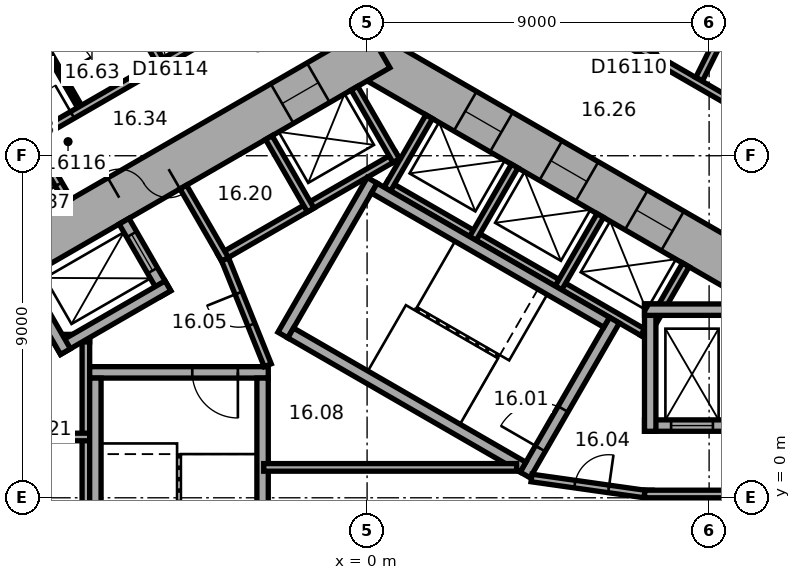
"""IFC4 building model, lengths in metres.
Left out: names, types, materials, properties, quantities, classifications, styles, units other than length and angle.
Written with IfcOpenShell. Run it as: python <this file> out.ifc"""

import sys

from ifc_helpers import new_model, si_unit, direction, frame, frame_2d, origin, place, context, subcontext, project, spatial, rectangle, extrude, element, fill, save


model = new_model("IFC4")
c1 = context("Model", 3, precision=1e-05, world=origin(), true_north=direction((0.0, 1.0)))
c2 = subcontext(c1, "Body", "Model", "MODEL_VIEW")
j1 = project(units=[si_unit("LENGTHUNIT", "METRE"), si_unit("PLANEANGLEUNIT", "RADIAN")], contexts=[c1])
p1 = place(None, origin())
s1 = spatial("IfcSite", under=j1, at=p1, CompositionType="ELEMENT")
p2 = place(p1, origin())
s2 = spatial("IfcBuilding", under=s1, at=p2, CompositionType="ELEMENT")
p3 = place(p2, frame((0.0, 0.0, 73.7)))
s3 = spatial("IfcBuildingStorey", under=s2, at=p3, CompositionType="ELEMENT", Elevation=73.7)
p4 = place(p3, frame((10.4, 5.658, 0.0), z_axis=(0.0, 0.0, 1.0), x_axis=(-0.866021384402, 0.500006961711, 0.0)))
e1 = element("IfcWall", 1, at=p4, inside=s3, PredefinedType="SHEAR", context=c2, shape_type="SweptSolid", body=[
    extrude(rectangle(XDim=12.355, YDim=1.2, at=frame_2d((6.178, 0.0))), origin(), (0.0, 0.0, 1.0), 3.3),
])
p5 = place(p4, frame((2.728, 0.0, 0.0)))
e2 = element("IfcOpeningElement", 2, at=p5, cuts=e1, PredefinedType="OPENING", context=c2, shape_type="SweptSolid", body=[
    extrude(rectangle(XDim=1.1, YDim=2.1, at=frame_2d((0.55, 1.05))), frame((0.0, 0.61, 0.0), z_axis=(0.0, -1.0, 0.0), x_axis=(1.0, 0.0, 0.0)), (0.0, 0.0, 1.0), 1.22),
])
p6 = place(p4, frame((5.328, 0.0, 0.0)))
e3 = element("IfcOpeningElement", 3, at=p6, cuts=e1, PredefinedType="OPENING", context=c2, shape_type="SweptSolid", body=[
    extrude(rectangle(XDim=1.1, YDim=2.1, at=frame_2d((0.55, 1.05))), frame((0.0, 0.61, 0.0), z_axis=(0.0, -1.0, 0.0), x_axis=(1.0, 0.0, 0.0)), (0.0, 0.0, 1.0), 1.22),
])
p7 = place(p4, frame((7.928, 0.0, 0.0)))
e4 = element("IfcOpeningElement", 4, at=p7, cuts=e1, PredefinedType="OPENING", context=c2, shape_type="SweptSolid", body=[
    extrude(rectangle(XDim=1.1, YDim=2.1, at=frame_2d((0.55, 1.05))), frame((0.0, 0.61, 0.0), z_axis=(0.0, -1.0, 0.0), x_axis=(1.0, 0.0, 0.0)), (0.0, 0.0, 1.0), 1.22),
])
p8 = place(p3, frame((0.3, 11.836, 0.0), z_axis=(0.0, 0.0, 1.0), x_axis=(-0.866021384402, -0.500006961711, 0.0)))
e5 = element("IfcWall", 5, at=p8, inside=s3, PredefinedType="SHEAR", context=c2, shape_type="SweptSolid", body=[
    extrude(rectangle(XDim=12.355, YDim=1.2, at=frame_2d((6.178, 0.0))), origin(), (0.0, 0.0, 1.0), 3.3),
])
p9 = place(p8, frame((6.378, 0.0, 0.0)))
e6 = element("IfcOpeningElement", 6, at=p9, cuts=e5, PredefinedType="OPENING", context=c2, shape_type="SweptSolid", body=[
    extrude(rectangle(XDim=1.5, YDim=2.1, at=frame_2d((0.75, 1.05))), frame((0.0, 0.61, 0.0), z_axis=(0.0, -1.0, 0.0), x_axis=(1.0, 0.0, 0.0)), (0.0, 0.0, 1.0), 1.22),
])
p10 = place(p8, frame((1.828, 0.0, 0.0)))
e7 = element("IfcOpeningElement", 7, at=p10, cuts=e5, PredefinedType="OPENING", context=c2, shape_type="SweptSolid", body=[
    extrude(rectangle(XDim=1.1, YDim=2.1, at=frame_2d((0.55, 1.05))), frame((0.0, 0.61, 0.0), z_axis=(0.0, -1.0, 0.0), x_axis=(1.0, 0.0, 0.0)), (0.0, 0.0, 1.0), 1.22),
])
p11 = place(p3, frame((7.4, -5.2, 0.0), z_axis=(0.0, 0.0, 1.0), x_axis=(0.0, 1.0, 0.0)))
e8 = element("IfcWall", 8, at=p11, inside=s3, PredefinedType="PARTITIONING", context=c2, shape_type="SweptSolid", body=[
    extrude(rectangle(XDim=5.4, YDim=0.2, at=frame_2d((2.7, 0.0))), origin(), (0.0, 0.0, 1.0), 2.95),
])
p12 = place(p3, frame((7.3, 0.1, 0.0), z_axis=(0.0, 0.0, 1.0), x_axis=(1.0, 0.0, 0.0)))
e9 = element("IfcWall", 9, at=p12, inside=s3, PredefinedType="PARTITIONING", context=c2, shape_type="SweptSolid", body=[
    extrude(rectangle(XDim=2.2, YDim=0.2, at=frame_2d((1.1, 0.0))), origin(), (0.0, 0.0, 1.0), 2.95),
])
p13 = place(p3, frame((7.424, 4.259, 0.0), z_axis=(0.0, 0.0, 1.0), x_axis=(-0.866026010844, 0.49999894854, 0.0)))
e10 = element("IfcWall", 10, at=p13, inside=s3, PredefinedType="PARTITIONING", context=c2, shape_type="SweptSolid", body=[
    extrude(rectangle(XDim=8.0, YDim=0.2, at=frame_2d((4.0, 0.0))), origin(), (0.0, 0.0, 1.0), 2.95),
])
for number, where, z_axis, x_axis in (
    (11, (7.287, 4.222, 0.0), (0.0, 0.0, 1.0), (0.5, 0.866, 0.0)),
    (12, (5.036, 5.522, 0.0), (0.0, 0.0, 1.0), (0.5, 0.866, 0.0)),
    (13, (2.784, 6.822, 0.0), (0.0, 0.0, 1.0), (0.5, 0.866, 0.0)),
    (14, (0.532, 8.122, 0.0), (0.0, 0.0, 1.0), (0.5, 0.866, 0.0)),
):
    element("IfcWall", number, at=place(p3, frame(where, z_axis=z_axis, x_axis=x_axis)), inside=s3, PredefinedType="PARTITIONING", context=c2, shape_type="SweptSolid", body=[
        extrude(rectangle(XDim=2.2, YDim=0.2, at=frame_2d((1.1, 0.0))), origin(), (0.0, 0.0, 1.0), 2.95),
    ])
p14 = place(p3, frame((0.803, 9.009, 0.0), z_axis=(0.0, 0.0, 1.0), x_axis=(-0.866028230842, -0.499995103361, 0.0)))
e15 = element("IfcWall", 15, at=p14, inside=s3, PredefinedType="PARTITIONING", context=c2, shape_type="SweptSolid", body=[
    extrude(rectangle(XDim=5.4, YDim=0.2, at=frame_2d((2.7, 0.0))), origin(), (0.0, 0.0, 1.0), 2.95),
])
p15 = place(p3, frame((0.767, 8.872, 0.0), z_axis=(0.0, 0.0, 1.0), x_axis=(-0.499994660107, 0.866028486751, 0.0)))
e16 = element("IfcWall", 16, at=p15, inside=s3, PredefinedType="PARTITIONING", context=c2, shape_type="SweptSolid", body=[
    extrude(rectangle(XDim=2.2, YDim=0.2, at=frame_2d((1.1, 0.0))), origin(), (0.0, 0.0, 1.0), 2.95),
])
for number, where, z_axis, x_axis in (
    (17, (-1.485, 7.572, 0.0), (0.0, 0.0, 1.0), (-0.5, 0.866, 0.0)),
    (18, (-3.737, 6.272, 0.0), (0.0, 0.0, 1.0), (-0.5, 0.866, 0.0)),
):
    element("IfcWall", number, at=place(p3, frame(where, z_axis=z_axis, x_axis=x_axis)), inside=s3, PredefinedType="PARTITIONING", context=c2, shape_type="SweptSolid", body=[
        extrude(rectangle(XDim=2.2, YDim=0.2, at=frame_2d((1.1, 0.0))), origin(), (0.0, 0.0, 1.0), 2.95),
    ])
p16 = place(p3, frame((-7.4, 4.3, 0.0), z_axis=(0.0, 0.0, 1.0), x_axis=(0.0, -1.0, 0.0)))
e19 = element("IfcWall", 19, at=p16, inside=s3, PredefinedType="PARTITIONING", context=c2, shape_type="SweptSolid", body=[
    extrude(rectangle(XDim=8.0, YDim=0.2, at=frame_2d((4.0, 0.0))), origin(), (0.0, 0.0, 1.0), 2.95),
])
for number, where, z_axis, x_axis in (
    (20, (-7.3, 4.2, 0.0), (0.0, 0.0, 1.0), (-1.0, 0.0, 0.0)),
    (21, (-7.3, 1.6, 0.0), (0.0, 0.0, 1.0), (-1.0, 0.0, 0.0)),
):
    element("IfcWall", number, at=place(p3, frame(where, z_axis=z_axis, x_axis=x_axis)), inside=s3, PredefinedType="PARTITIONING", context=c2, shape_type="SweptSolid", body=[
        extrude(rectangle(XDim=2.2, YDim=0.2, at=frame_2d((1.1, 0.0))), origin(), (0.0, 0.0, 1.0), 2.95),
    ])
p17 = place(p3, frame((4.158, 0.602, 0.0), z_axis=(0.0, 0.0, 1.0), x_axis=(0.499977259774, 0.866038532462, 0.0)))
e22 = element("IfcWall", 22, at=p17, inside=s3, PredefinedType="SHEAR", context=c2, shape_type="SweptSolid", body=[
    extrude(rectangle(XDim=4.7, YDim=0.3, at=frame_2d((2.35, 0.0))), origin(), (0.0, 0.0, 1.0), 2.95),
])
p18 = place(p17, frame((0.8, 0.0, 0.0)))
e23 = element("IfcOpeningElement", 23, at=p18, cuts=e22, PredefinedType="OPENING", context=c2, shape_type="SweptSolid", body=[
    extrude(rectangle(XDim=1.2, YDim=2.1, at=frame_2d((0.6, 1.05))), frame((0.0, 0.16, 0.0), z_axis=(0.0, -1.0, 0.0), x_axis=(1.0, 0.0, 0.0)), (0.0, 0.0, 1.0), 0.32),
])
p19 = place(p3, frame((-2.216, 4.282, 0.0), z_axis=(0.0, 0.0, 1.0), x_axis=(0.499977259774, 0.866038532462, 0.0)))
e24 = element("IfcWall", 24, at=p19, inside=s3, PredefinedType="SHEAR", context=c2, shape_type="SweptSolid", body=[
    extrude(rectangle(XDim=4.7, YDim=0.3, at=frame_2d((2.35, 0.0))), origin(), (0.0, 0.0, 1.0), 2.95),
])
for number, where, z_axis, x_axis in (
    (25, (4.103, 0.807, 0.0), (0.0, 0.0, 1.0), (-0.866, 0.5, 0.0)),
    (26, (6.303, 4.617, 0.0), (0.0, 0.0, 1.0), (-0.866, 0.5, 0.0)),
):
    element("IfcWall", number, at=place(p3, frame(where, z_axis=z_axis, x_axis=x_axis)), inside=s3, PredefinedType="SHEAR", context=c2, shape_type="SweptSolid", body=[
        extrude(rectangle(XDim=7.06, YDim=0.3, at=frame_2d((3.53, 0.0))), origin(), (0.0, 0.0, 1.0), 2.95),
    ])
p20 = place(p3, frame((-2.6, 3.3, 0.0), z_axis=(0.0, 0.0, 1.0), x_axis=(-1.0, 0.0, 0.0)))
e27 = element("IfcWall", 27, at=p20, inside=s3, PredefinedType="SHEAR", context=c2, shape_type="SweptSolid", body=[
    extrude(rectangle(XDim=4.7, YDim=0.3, at=frame_2d((2.35, 0.0))), origin(), (0.0, 0.0, 1.0), 2.95),
])
p21 = place(p20, frame((0.8, 0.0, 0.0)))
e28 = element("IfcOpeningElement", 28, at=p21, cuts=e27, PredefinedType="OPENING", context=c2, shape_type="SweptSolid", body=[
    extrude(rectangle(XDim=1.2, YDim=2.1, at=frame_2d((0.6, 1.05))), frame((0.0, 0.16, 0.0), z_axis=(0.0, -1.0, 0.0), x_axis=(1.0, 0.0, 0.0)), (0.0, 0.0, 1.0), 0.32),
])
for number, where, z_axis, x_axis in (
    (29, (-2.75, 3.15, 0.0), (0.0, 0.0, 1.0), (0.0, -1.0, 0.0)),
    (30, (-7.15, 3.15, 0.0), (0.0, 0.0, 1.0), (0.0, -1.0, 0.0)),
):
    element("IfcWall", number, at=place(p3, frame(where, z_axis=z_axis, x_axis=x_axis)), inside=s3, PredefinedType="SHEAR", context=c2, shape_type="SweptSolid", body=[
        extrude(rectangle(XDim=7.06, YDim=0.3, at=frame_2d((3.53, 0.0))), origin(), (0.0, 0.0, 1.0), 2.95),
    ])
p22 = place(p3, frame((7.3, 1.9, 0.0), z_axis=(0.0, 0.0, 1.0), x_axis=(1.0, 0.0, 0.0)))
e31 = element("IfcWall", 31, at=p22, inside=s3, PredefinedType="SHEAR", context=c2, shape_type="SweptSolid", body=[
    extrude(rectangle(XDim=2.2, YDim=0.3, at=frame_2d((1.1, 0.0))), origin(), (0.0, 0.0, 1.0), 2.95),
])
p23 = place(p22, frame((0.7, 0.0, 0.0)))
e32 = element("IfcOpeningElement", 32, at=p23, cuts=e31, PredefinedType="OPENING", context=c2, shape_type="SweptSolid", body=[
    extrude(rectangle(XDim=1.1, YDim=2.1, at=frame_2d((0.55, 1.05))), frame((0.0, 0.16, 0.0), z_axis=(0.0, -1.0, 0.0), x_axis=(1.0, 0.0, 0.0)), (0.0, 0.0, 1.0), 0.32),
])
p24 = place(p3, frame((7.45, 1.75, 0.0), z_axis=(0.0, 0.0, 1.0), x_axis=(0.0, 1.0, 0.0)))
e33 = element("IfcWall", 33, at=p24, inside=s3, PredefinedType="SHEAR", context=c2, shape_type="SweptSolid", body=[
    extrude(rectangle(XDim=3.35, YDim=0.3, at=frame_2d((1.675, 0.0))), origin(), (0.0, 0.0, 1.0), 2.95),
])
p25 = place(p3, frame((7.3, 4.95, 0.0), z_axis=(0.0, 0.0, 1.0), x_axis=(1.0, 0.0, 0.0)))
e34 = element("IfcWall", 34, at=p25, inside=s3, PredefinedType="SHEAR", context=c2, shape_type="SweptSolid", body=[
    extrude(rectangle(XDim=2.2, YDim=0.3, at=frame_2d((1.1, 0.0))), origin(), (0.0, 0.0, 1.0), 2.95),
])
p26 = place(p3, frame((4.327, 0.521, 0.0), z_axis=(0.0, 0.0, 1.0), x_axis=(0.990124376366, -0.14019172346, 0.0)))
e35 = element("IfcWall", 35, at=p26, inside=s3, PredefinedType="PARTITIONING", context=c2, shape_type="SweptSolid", body=[
    extrude(rectangle(XDim=3.002, YDim=0.2, at=frame_2d((1.501, 0.0))), origin(), (0.0, 0.0, 1.0), 2.95),
])
p27 = place(p26, frame((1.15, 0.0, 0.0)))
e36 = element("IfcOpeningElement", 36, at=p27, cuts=e35, PredefinedType="OPENING", context=c2, shape_type="SweptSolid", body=[
    extrude(rectangle(XDim=0.9, YDim=2.1, at=frame_2d((0.45, 1.05))), frame((0.0, 0.11, 0.0), z_axis=(0.0, -1.0, 0.0), x_axis=(1.0, 0.0, 0.0)), (0.0, 0.0, 1.0), 0.22),
])
p28 = place(p3, frame((-5.295, 5.372, 0.0), z_axis=(0.0, 0.0, 1.0), x_axis=(-0.500077893725, 0.86598042715, 0.0)))
e37 = element("IfcWall", 37, at=p28, inside=s3, PredefinedType="SHEAR", context=c2, shape_type="SweptSolid", body=[
    extrude(rectangle(XDim=2.2, YDim=0.3, at=frame_2d((1.1, 0.0))), origin(), (0.0, 0.0, 1.0), 2.95),
])
p29 = place(p28, frame((0.7, 0.0, 0.0)))
e38 = element("IfcOpeningElement", 38, at=p29, cuts=e37, PredefinedType="OPENING", context=c2, shape_type="SweptSolid", body=[
    extrude(rectangle(XDim=1.1, YDim=2.1, at=frame_2d((0.55, 1.05))), frame((0.0, 0.16, 0.0), z_axis=(0.0, -1.0, 0.0), x_axis=(1.0, 0.0, 0.0)), (0.0, 0.0, 1.0), 0.32),
])
p30 = place(p3, frame((-5.24, 5.577, 0.0), z_axis=(0.0, 0.0, 1.0), x_axis=(-0.866014461049, -0.500018952895, 0.0)))
e39 = element("IfcWall", 39, at=p30, inside=s3, PredefinedType="SHEAR", context=c2, shape_type="SweptSolid", body=[
    extrude(rectangle(XDim=3.35, YDim=0.3, at=frame_2d((1.675, 0.0))), origin(), (0.0, 0.0, 1.0), 2.95),
])
p31 = place(p3, frame((-7.937, 3.847, 0.0), z_axis=(0.0, 0.0, 1.0), x_axis=(-0.50002983664, 0.866008176907, 0.0)))
e40 = element("IfcWall", 40, at=p31, inside=s3, PredefinedType="SHEAR", context=c2, shape_type="SweptSolid", body=[
    extrude(rectangle(XDim=2.2, YDim=0.3, at=frame_2d((1.1, 0.0))), origin(), (0.0, 0.0, 1.0), 2.95),
])
p32 = place(p3, frame((-2.615, 3.487, 0.0), z_axis=(0.0, 0.0, 1.0), x_axis=(-0.373576831041, 0.92759924068, 0.0)))
e41 = element("IfcWall", 41, at=p32, inside=s3, PredefinedType="PARTITIONING", context=c2, shape_type="SweptSolid", body=[
    extrude(rectangle(XDim=3.002, YDim=0.2, at=frame_2d((1.501, 0.0))), origin(), (0.0, 0.0, 1.0), 2.95),
])
p33 = place(p32, frame((1.15, 0.0, 0.0)))
e42 = element("IfcOpeningElement", 42, at=p33, cuts=e41, PredefinedType="OPENING", context=c2, shape_type="SweptSolid", body=[
    extrude(rectangle(XDim=0.9, YDim=2.1, at=frame_2d((0.45, 1.05))), frame((0.0, 0.11, 0.0), z_axis=(0.0, -1.0, 0.0), x_axis=(1.0, 0.0, 0.0)), (0.0, 0.0, 1.0), 0.22),
])
p34 = place(p3, frame((-2.72, 0.8, 0.0), z_axis=(0.0, 0.0, 1.0), x_axis=(1.0, 0.0, 0.0)))
e43 = element("IfcWall", 43, at=p34, inside=s3, PredefinedType="PARTITIONING", context=c2, shape_type="SweptSolid", body=[
    extrude(rectangle(XDim=6.654, YDim=0.2, at=frame_2d((3.327, 0.0))), origin(), (0.0, 0.0, 1.0), 2.95),
])
p35 = place(p3, frame((-10.083, 19.524, 0.0), z_axis=(0.0, 0.0, 1.0), x_axis=(0.499999662836, -0.866025598446, 0.0)))
e44 = element("IfcWall", 44, at=p35, inside=s3, PredefinedType="PARTITIONING", context=c2, shape_type="SweptSolid", body=[
    extrude(rectangle(XDim=9.25, YDim=0.2, at=frame_2d((4.625, 0.0))), origin(), (0.0, 0.0, 1.0), 2.15),
])
p36 = place(p3, frame((-7.865, 7.814, 0.0), z_axis=(0.0, 0.0, 1.0), x_axis=(-0.500004234368, 0.866022959057, 0.0)))
e45 = element("IfcWall", 45, at=p36, inside=s3, PredefinedType="PARTITIONING", context=c2, shape_type="SweptSolid", body=[
    extrude(rectangle(XDim=11.25, YDim=0.2, at=frame_2d((5.625, 0.0))), origin(), (0.0, 0.0, 1.0), 2.95),
])
p37 = place(p36, frame((0.5, 0.0, 0.0)))
e46 = element("IfcOpeningElement", 46, at=p37, cuts=e45, PredefinedType="OPENING", context=c2, shape_type="SweptSolid", body=[
    extrude(rectangle(XDim=0.9, YDim=2.1, at=frame_2d((0.45, 1.05))), frame((0.0, 0.11, 0.0), z_axis=(0.0, -1.0, 0.0), x_axis=(1.0, 0.0, 0.0)), (0.0, 0.0, 1.0), 0.22),
])
p38 = place(p3, frame((-7.566, 10.296, 0.0), z_axis=(0.0, 0.0, 1.0), x_axis=(-0.499985389037, 0.866033839264, 0.0)))
e47 = element("IfcWall", 47, at=p38, inside=s3, PredefinedType="PARTITIONING", context=c2, shape_type="SweptSolid", body=[
    extrude(rectangle(XDim=2.84, YDim=0.12, at=frame_2d((1.42, 0.0))), origin(), (0.0, 0.0, 1.0), 2.95),
])
p39 = place(p38, frame((0.97, 0.0, 0.0)))
e48 = element("IfcOpeningElement", 48, at=p39, cuts=e47, PredefinedType="OPENING", context=c2, shape_type="SweptSolid", body=[
    extrude(rectangle(XDim=0.9, YDim=2.1, at=frame_2d((0.45, 1.05))), frame((0.0, 0.07, 0.0), z_axis=(0.0, -1.0, 0.0), x_axis=(1.0, 0.0, 0.0)), (0.0, 0.0, 1.0), 0.14),
])
p40 = place(p3, frame((-4.309, 12.061, 0.0), z_axis=(0.0, 0.0, 1.0), x_axis=(-0.866020679205, -0.500008183122, 0.0)))
e49 = element("IfcWall", 49, at=p40, inside=s3, PredefinedType="PARTITIONING", context=c2, shape_type="SweptSolid", body=[
    extrude(rectangle(XDim=5.104, YDim=0.2, at=frame_2d((2.552, 0.0))), origin(), (0.0, 0.0, 1.0), 2.95),
])
p41 = place(p40, frame((0.185, 0.0, 0.0)))
e50 = element("IfcOpeningElement", 50, at=p41, cuts=e49, PredefinedType="OPENING", context=c2, shape_type="SweptSolid", body=[
    extrude(rectangle(XDim=0.9, YDim=2.1, at=frame_2d((0.45, 1.05))), frame((0.0, 0.11, 0.0), z_axis=(0.0, -1.0, 0.0), x_axis=(1.0, 0.0, 0.0)), (0.0, 0.0, 1.0), 0.22),
])
p42 = place(p40, frame((3.979, 0.0, 0.0)))
e51 = element("IfcOpeningElement", 51, at=p42, cuts=e49, PredefinedType="OPENING", context=c2, shape_type="SweptSolid", body=[
    extrude(rectangle(XDim=0.9, YDim=2.1, at=frame_2d((0.45, 1.05))), frame((0.0, 0.11, 0.0), z_axis=(0.0, -1.0, 0.0), x_axis=(1.0, 0.0, 0.0)), (0.0, 0.0, 1.0), 0.22),
])
p43 = place(p3, frame((10.885, 9.652, 0.0), z_axis=(0.0, 0.0, 1.0), x_axis=(-0.866033277307, 0.499986362411, 0.0)))
e52 = element("IfcWall", 52, at=p43, inside=s3, PredefinedType="PARTITIONING", context=c2, shape_type="SweptSolid", body=[
    extrude(rectangle(XDim=8.702, YDim=0.2, at=frame_2d((4.351, 0.0))), origin(), (0.0, 0.0, 1.0), 2.95),
])
p44 = place(p43, frame((3.844, 0.0, 0.0)))
e53 = element("IfcOpeningElement", 53, at=p44, cuts=e52, PredefinedType="OPENING", context=c2, shape_type="SweptSolid", body=[
    extrude(rectangle(XDim=0.9, YDim=2.1, at=frame_2d((0.45, 1.05))), frame((0.0, 0.11, 0.0), z_axis=(0.0, -1.0, 0.0), x_axis=(1.0, 0.0, 0.0)), (0.0, 0.0, 1.0), 0.22),
])
p45 = place(p3, frame((12.393, 18.348, 0.0), z_axis=(0.0, 0.0, 1.0), x_axis=(-0.446176022699, -0.894945225569, 0.0)))
e54 = element("IfcWall", 54, at=p45, inside=s3, PredefinedType="PARTITIONING", context=c2, shape_type="SweptSolid", body=[
    extrude(rectangle(XDim=8.191, YDim=0.2, at=frame_2d((4.095, 0.0))), origin(), (0.0, 0.0, 1.0), 2.15),
])
p46 = place(p9, origin())
e55 = element("IfcDoor", 55, at=p46, inside=s3, OperationType="DOUBLE_DOOR_SINGLE_SWING", PredefinedType="DOOR", context=c2, shape_type="SweptSolid", body=[
    extrude(rectangle(XDim=1.5, YDim=2.1, at=frame_2d((0.75, 1.05))), frame((0.0, 0.025, 0.0), z_axis=(0.0, -1.0, 0.0), x_axis=(1.0, 0.0, 0.0)), (0.0, 0.0, 1.0), 0.05),
])
fill(e6, e55)
p47 = place(p18, origin())
e56 = element("IfcDoor", 56, at=p47, inside=s3, OperationType="SINGLE_SWING_RIGHT", PredefinedType="DOOR", context=c2, shape_type="SweptSolid", body=[
    extrude(rectangle(XDim=1.2, YDim=2.1, at=frame_2d((0.6, 1.05))), frame((0.0, 0.025, 0.0), z_axis=(0.0, -1.0, 0.0), x_axis=(1.0, 0.0, 0.0)), (0.0, 0.0, 1.0), 0.05),
])
fill(e23, e56)
p48 = place(p21, origin())
e57 = element("IfcDoor", 57, at=p48, inside=s3, OperationType="SINGLE_SWING_RIGHT", PredefinedType="DOOR", context=c2, shape_type="SweptSolid", body=[
    extrude(rectangle(XDim=1.2, YDim=2.1, at=frame_2d((0.6, 1.05))), frame((0.0, 0.025, 0.0), z_axis=(0.0, -1.0, 0.0), x_axis=(1.0, 0.0, 0.0)), (0.0, 0.0, 1.0), 0.05),
])
fill(e28, e57)
p49 = place(p27, origin())
e58 = element("IfcDoor", 58, at=p49, inside=s3, OperationType="SINGLE_SWING_LEFT", PredefinedType="DOOR", context=c2, shape_type="SweptSolid", body=[
    extrude(rectangle(XDim=0.9, YDim=2.1, at=frame_2d((0.45, 1.05))), frame((0.0, 0.025, 0.0), z_axis=(0.0, -1.0, 0.0), x_axis=(1.0, 0.0, 0.0)), (0.0, 0.0, 1.0), 0.05),
])
fill(e36, e58)
p50 = place(p33, origin())
e59 = element("IfcDoor", 59, at=p50, inside=s3, OperationType="SINGLE_SWING_LEFT", PredefinedType="DOOR", context=c2, shape_type="SweptSolid", body=[
    extrude(rectangle(XDim=0.9, YDim=2.1, at=frame_2d((0.45, 1.05))), frame((0.0, 0.025, 0.0), z_axis=(0.0, -1.0, 0.0), x_axis=(1.0, 0.0, 0.0)), (0.0, 0.0, 1.0), 0.05),
])
fill(e42, e59)
p51 = place(p23, origin())
e60 = element("IfcDoor", 60, at=p51, inside=s3, OperationType="DOUBLE_DOOR_SLIDING", PredefinedType="DOOR", context=c2, shape_type="SweptSolid", body=[
    extrude(rectangle(XDim=1.1, YDim=2.1, at=frame_2d((0.55, 1.05))), frame((0.0, 0.025, 0.0), z_axis=(0.0, -1.0, 0.0), x_axis=(1.0, 0.0, 0.0)), (0.0, 0.0, 1.0), 0.05),
])
fill(e32, e60)
p52 = place(p29, origin())
e61 = element("IfcDoor", 61, at=p52, inside=s3, OperationType="DOUBLE_DOOR_SLIDING", PredefinedType="DOOR", context=c2, shape_type="SweptSolid", body=[
    extrude(rectangle(XDim=1.1, YDim=2.1, at=frame_2d((0.55, 1.05))), frame((0.0, 0.025, 0.0), z_axis=(0.0, -1.0, 0.0), x_axis=(1.0, 0.0, 0.0)), (0.0, 0.0, 1.0), 0.05),
])
fill(e38, e61)
p53 = place(p5, origin())
e62 = element("IfcDoor", 62, at=p53, inside=s3, OperationType="DOUBLE_DOOR_SLIDING", PredefinedType="DOOR", context=c2, shape_type="SweptSolid", body=[
    extrude(rectangle(XDim=1.1, YDim=2.1, at=frame_2d((0.55, 1.05))), frame((0.0, 0.025, 0.0), z_axis=(0.0, -1.0, 0.0), x_axis=(1.0, 0.0, 0.0)), (0.0, 0.0, 1.0), 0.05),
])
fill(e2, e62)
p54 = place(p6, origin())
e63 = element("IfcDoor", 63, at=p54, inside=s3, OperationType="DOUBLE_DOOR_SLIDING", PredefinedType="DOOR", context=c2, shape_type="SweptSolid", body=[
    extrude(rectangle(XDim=1.1, YDim=2.1, at=frame_2d((0.55, 1.05))), frame((0.0, 0.025, 0.0), z_axis=(0.0, -1.0, 0.0), x_axis=(1.0, 0.0, 0.0)), (0.0, 0.0, 1.0), 0.05),
])
fill(e3, e63)
p55 = place(p7, origin())
e64 = element("IfcDoor", 64, at=p55, inside=s3, OperationType="DOUBLE_DOOR_SLIDING", PredefinedType="DOOR", context=c2, shape_type="SweptSolid", body=[
    extrude(rectangle(XDim=1.1, YDim=2.1, at=frame_2d((0.55, 1.05))), frame((0.0, 0.025, 0.0), z_axis=(0.0, -1.0, 0.0), x_axis=(1.0, 0.0, 0.0)), (0.0, 0.0, 1.0), 0.05),
])
fill(e4, e64)
p56 = place(p10, origin())
e65 = element("IfcDoor", 65, at=p56, inside=s3, OperationType="DOUBLE_DOOR_SLIDING", PredefinedType="DOOR", context=c2, shape_type="SweptSolid", body=[
    extrude(rectangle(XDim=1.1, YDim=2.1, at=frame_2d((0.55, 1.05))), frame((0.0, 0.025, 0.0), z_axis=(0.0, -1.0, 0.0), x_axis=(1.0, 0.0, 0.0)), (0.0, 0.0, 1.0), 0.05),
])
fill(e7, e65)
p57 = place(p44, origin())
e66 = element("IfcDoor", 66, at=p57, inside=s3, OperationType="SINGLE_SWING_LEFT", PredefinedType="DOOR", context=c2, shape_type="SweptSolid", body=[
    extrude(rectangle(XDim=0.9, YDim=2.1, at=frame_2d((0.45, 1.05))), frame((0.0, 0.025, 0.0), z_axis=(0.0, -1.0, 0.0), x_axis=(1.0, 0.0, 0.0)), (0.0, 0.0, 1.0), 0.05),
])
fill(e53, e66)
p58 = place(p41, origin())
e67 = element("IfcDoor", 67, at=p58, inside=s3, OperationType="SINGLE_SWING_LEFT", PredefinedType="DOOR", context=c2, shape_type="SweptSolid", body=[
    extrude(rectangle(XDim=0.9, YDim=2.1, at=frame_2d((0.45, 1.05))), frame((0.0, 0.025, 0.0), z_axis=(0.0, -1.0, 0.0), x_axis=(1.0, 0.0, 0.0)), (0.0, 0.0, 1.0), 0.05),
])
fill(e50, e67)
p59 = place(p42, origin())
e68 = element("IfcDoor", 68, at=p59, inside=s3, OperationType="SINGLE_SWING_LEFT", PredefinedType="DOOR", context=c2, shape_type="SweptSolid", body=[
    extrude(rectangle(XDim=0.9, YDim=2.1, at=frame_2d((0.45, 1.05))), frame((0.0, 0.025, 0.0), z_axis=(0.0, -1.0, 0.0), x_axis=(1.0, 0.0, 0.0)), (0.0, 0.0, 1.0), 0.05),
])
fill(e51, e68)
p60 = place(p39, origin())
e69 = element("IfcDoor", 69, at=p60, inside=s3, OperationType="SINGLE_SWING_LEFT", PredefinedType="DOOR", context=c2, shape_type="SweptSolid", body=[
    extrude(rectangle(XDim=0.9, YDim=2.1, at=frame_2d((0.45, 1.05))), frame((0.0, 0.025, 0.0), z_axis=(0.0, -1.0, 0.0), x_axis=(1.0, 0.0, 0.0)), (0.0, 0.0, 1.0), 0.05),
])
fill(e48, e69)
p61 = place(p37, origin())
e70 = element("IfcDoor", 70, at=p61, inside=s3, OperationType="SINGLE_SWING_LEFT", PredefinedType="DOOR", context=c2, shape_type="SweptSolid", body=[
    extrude(rectangle(XDim=0.9, YDim=2.1, at=frame_2d((0.45, 1.05))), frame((0.0, 0.025, 0.0), z_axis=(0.0, -1.0, 0.0), x_axis=(1.0, 0.0, 0.0)), (0.0, 0.0, 1.0), 0.05),
])
fill(e46, e70)
save(model, sys.argv[1])
